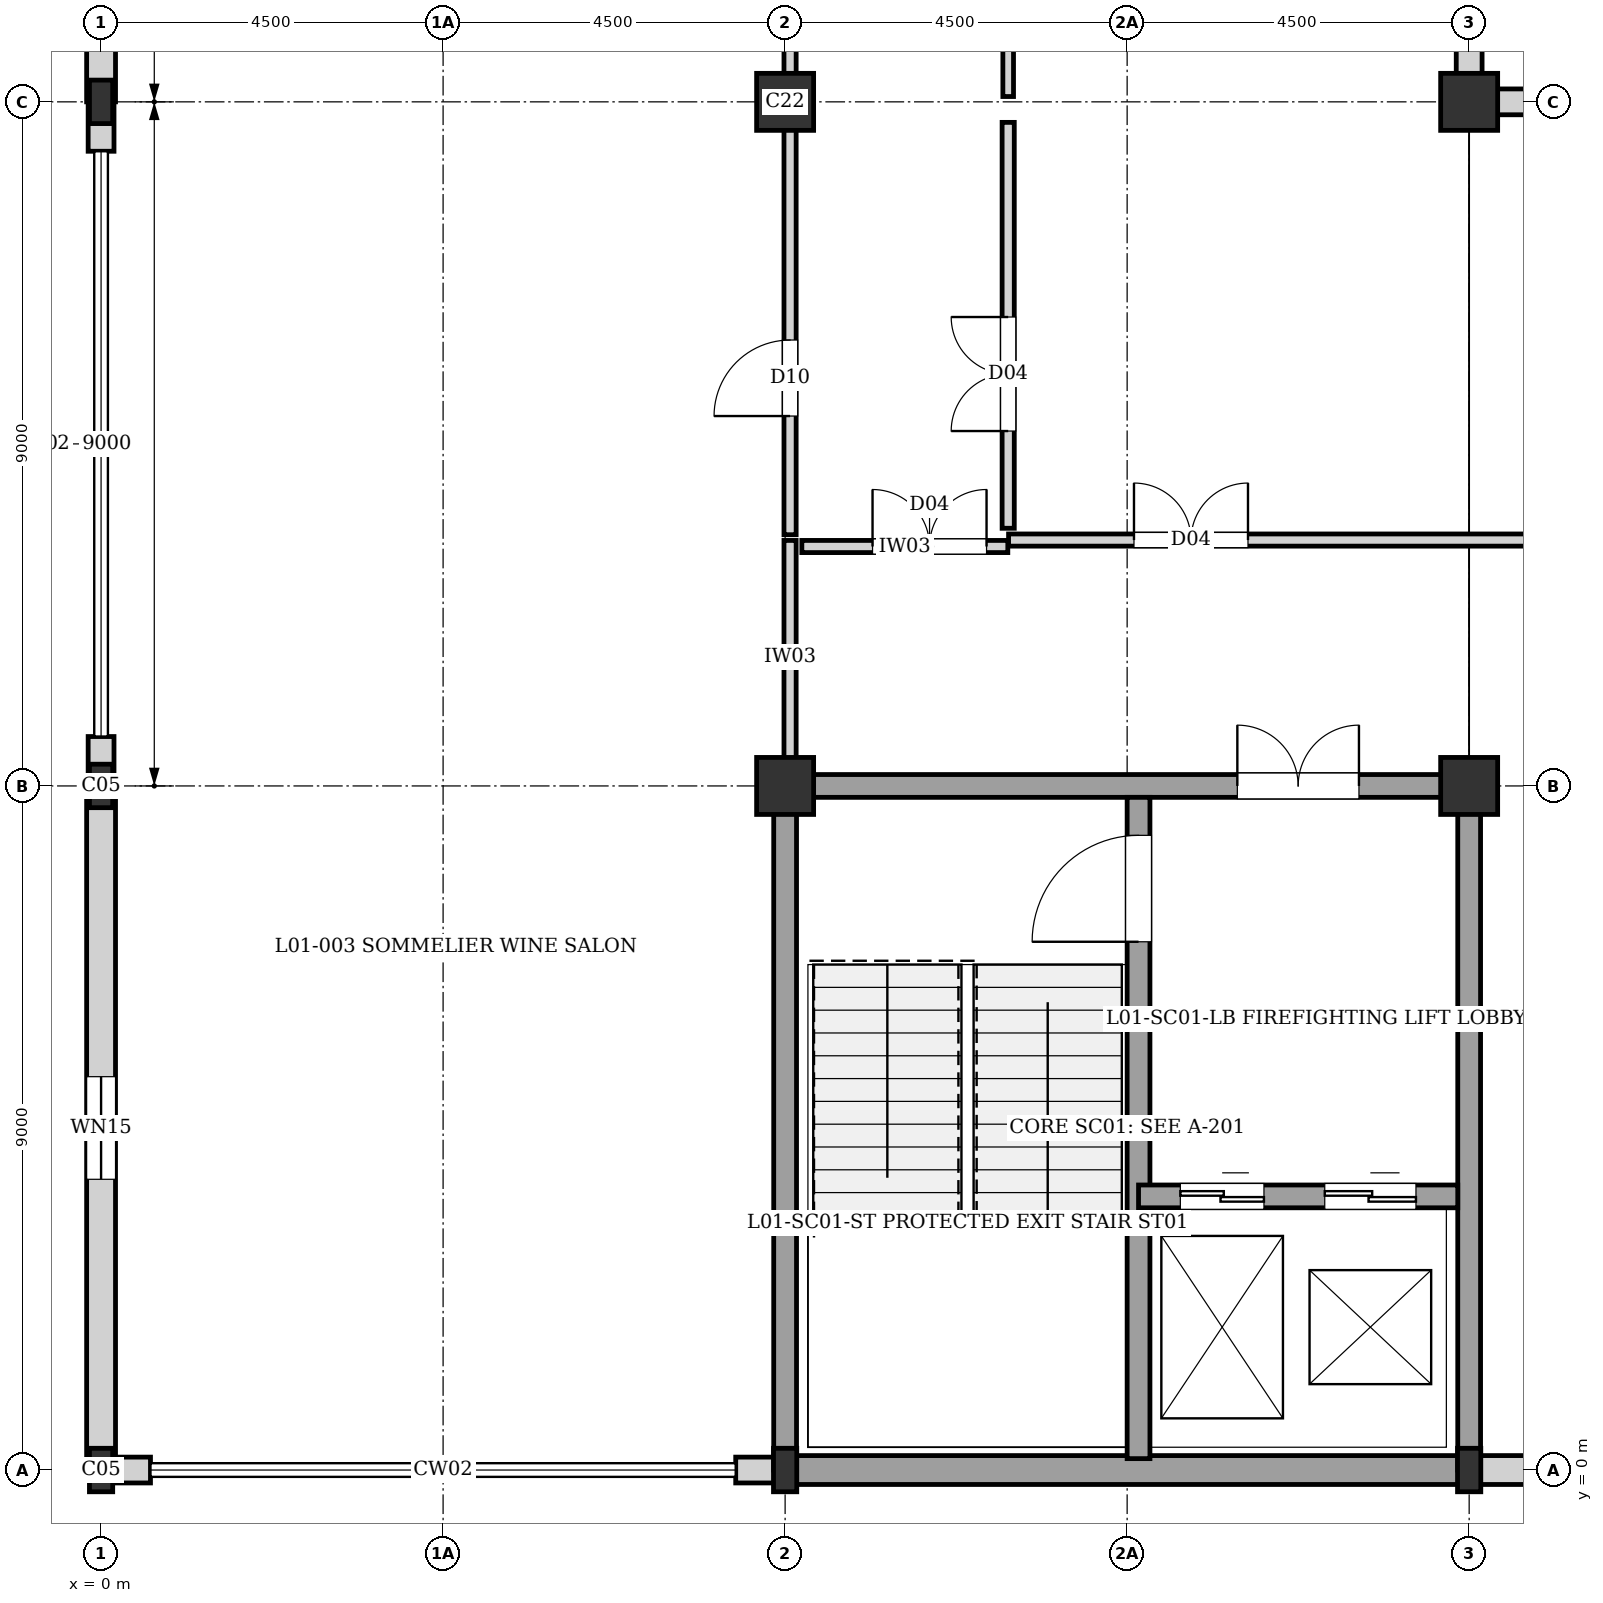
"""IFC4 building model, lengths in metres.
Left out: names, types, materials, properties, quantities, classifications, styles, units other than length and angle.
Written with IfcOpenShell. Run it as: python <this file> out.ifc"""

import sys

from ifc_helpers import new_model, si_unit, direction, frame, frame_2d, origin, origin_2d, place, context, subcontext, project, spatial, rectangle, i_section, extrude, element, fill, save


model = new_model("IFC4")
c1 = context("Model", 3, precision=1e-05, world=origin(), true_north=direction((0.0, 1.0)))
c2 = subcontext(c1, "Body", "Model", "MODEL_VIEW")
j1 = project(units=[si_unit("LENGTHUNIT", "METRE"), si_unit("PLANEANGLEUNIT", "RADIAN")], contexts=[c1])
p1 = place(None, origin())
s1 = spatial("IfcSite", under=j1, at=p1, CompositionType="ELEMENT")
p2 = place(p1, origin())
s2 = spatial("IfcBuilding", under=s1, at=p2, CompositionType="ELEMENT")
p3 = place(p2, frame((0.0, 0.0, 4.32)))
s3 = spatial("IfcBuildingStorey", under=s2, at=p3, CompositionType="ELEMENT", Elevation=4.32)
for number, where, z_axis, x_axis in (
    (1, (0.0, 0.0, 0.0), (0.0, 0.0, 1.0), (1.0, 0.0, 0.0)),
    (2, (0.0, 9.0, 0.0), (0.0, 0.0, 1.0), (1.0, 0.0, 0.0)),
    (3, (0.0, 18.0, 0.0), (0.0, 0.0, 1.0), (1.0, 0.0, 0.0)),
    (4, (9.0, 0.0, 0.0), (0.0, 0.0, 1.0), (1.0, 0.0, 0.0)),
):
    element("IfcColumn", number, at=place(p3, frame(where, z_axis=z_axis, x_axis=x_axis)), inside=s3, PredefinedType="COLUMN", context=c2, shape_type="SweptSolid", body=[
        extrude(i_section(OverallWidth=0.306, OverallDepth=0.572, WebThickness=0.021, FlangeThickness=0.04, at=origin_2d()), origin(), (0.0, 0.0, 1.0), 3.84),
    ])
for number, where, z_axis, x_axis in (
    (5, (9.0, 9.0, 0.0), (0.0, 0.0, 1.0), (1.0, 0.0, 0.0)),
    (6, (9.0, 18.0, 0.0), (0.0, 0.0, 1.0), (1.0, 0.0, 0.0)),
):
    element("IfcColumn", number, at=place(p3, frame(where, z_axis=z_axis, x_axis=x_axis)), inside=s3, PredefinedType="COLUMN", context=c2, shape_type="SweptSolid", body=[
        extrude(rectangle(XDim=0.75, YDim=0.75, at=origin_2d()), origin(), (0.0, 0.0, 1.0), 3.84),
    ])
p4 = place(p3, frame((18.0, 0.0, 0.0), z_axis=(0.0, 0.0, 1.0), x_axis=(1.0, 0.0, 0.0)))
e7 = element("IfcColumn", 7, at=p4, inside=s3, PredefinedType="COLUMN", context=c2, shape_type="SweptSolid", body=[
    extrude(i_section(OverallWidth=0.306, OverallDepth=0.572, WebThickness=0.021, FlangeThickness=0.04, at=origin_2d()), origin(), (0.0, 0.0, 1.0), 3.84),
])
for number, where, z_axis, x_axis in (
    (8, (18.0, 9.0, 0.0), (0.0, 0.0, 1.0), (1.0, 0.0, 0.0)),
    (9, (18.0, 18.0, 0.0), (0.0, 0.0, 1.0), (1.0, 0.0, 0.0)),
):
    element("IfcColumn", number, at=place(p3, frame(where, z_axis=z_axis, x_axis=x_axis)), inside=s3, PredefinedType="COLUMN", context=c2, shape_type="SweptSolid", body=[
        extrude(rectangle(XDim=0.75, YDim=0.75, at=origin_2d()), origin(), (0.0, 0.0, 1.0), 3.84),
    ])
p5 = place(p3, frame((27.0, 0.0, 0.0), z_axis=(0.0, 0.0, 1.0), x_axis=(-1.0, 0.0, 0.0)))
e10 = element("IfcWall", 10, at=p5, inside=s3, PredefinedType="SOLIDWALL", context=c2, shape_type="SweptSolid", body=[
    extrude(rectangle(XDim=8.87, YDim=0.38, at=frame_2d((4.435, 0.0))), origin(), (0.0, 0.0, 1.0), 2.38),
])
p6 = place(p3, frame((18.0, 0.0, 0.0), z_axis=(0.0, 0.0, 1.0), x_axis=(-1.0, 0.0, 0.0)))
e11 = element("IfcWall", 11, at=p6, inside=s3, PredefinedType="SOLIDWALL", context=c2, shape_type="SweptSolid", body=[
    extrude(rectangle(XDim=9.0, YDim=0.38, at=frame_2d((4.5, 0.0))), origin(), (0.0, 0.0, 1.0), 3.6),
])
p7 = place(p3, frame((8.87, 0.0, 0.0), z_axis=(0.0, 0.0, 1.0), x_axis=(-1.0, 0.0, 0.0)))
e12 = element("IfcWall", 12, at=p7, inside=s3, PredefinedType="SOLIDWALL", context=c2, shape_type="SweptSolid", body=[
    extrude(rectangle(XDim=0.52, YDim=0.34, at=frame_2d((0.26, 0.0))), origin(), (0.0, 0.0, 1.0), 3.18),
])
p8 = place(p3, frame((0.65, 0.0, 0.0), z_axis=(0.0, 0.0, 1.0), x_axis=(-1.0, 0.0, 0.0)))
e13 = element("IfcWall", 13, at=p8, inside=s3, PredefinedType="SOLIDWALL", context=c2, shape_type="SweptSolid", body=[
    extrude(rectangle(XDim=0.65, YDim=0.34, at=frame_2d((0.325, 0.0))), origin(), (0.0, 0.0, 1.0), 3.18),
])
p9 = place(p3, frame((0.0, 0.155, 0.0), z_axis=(0.0, 0.0, 1.0), x_axis=(0.0, 1.0, 0.0)))
e14 = element("IfcWall", 14, at=p9, inside=s3, PredefinedType="SOLIDWALL", context=c2, shape_type="SweptSolid", body=[
    extrude(rectangle(XDim=8.845, YDim=0.38, at=frame_2d((4.422, 0.0))), origin(), (0.0, 0.0, 1.0), 3.6),
])
p10 = place(p9, frame((3.67, 0.0, 0.4)))
e15 = element("IfcOpeningElement", 15, at=p10, cuts=e14, PredefinedType="OPENING", context=c2, shape_type="SweptSolid", body=[
    extrude(rectangle(XDim=1.35, YDim=1.8, at=frame_2d((0.675, 0.9))), frame((0.0, 0.2, 0.0), z_axis=(0.0, -1.0, 0.0), x_axis=(1.0, 0.0, 0.0)), (0.0, 0.0, 1.0), 0.4),
])
for number, where, z_axis, x_axis in (
    (16, (0.0, 9.0, 0.0), (0.0, 0.0, 1.0), (0.0, 1.0, 0.0)),
    (17, (0.0, 17.35, 0.0), (0.0, 0.0, 1.0), (0.0, 1.0, 0.0)),
):
    element("IfcWall", number, at=place(p3, frame(where, z_axis=z_axis, x_axis=x_axis)), inside=s3, PredefinedType="SOLIDWALL", context=c2, shape_type="SweptSolid", body=[
        extrude(rectangle(XDim=0.65, YDim=0.34, at=frame_2d((0.325, 0.0))), origin(), (0.0, 0.0, 1.0), 3.28),
    ])
p11 = place(p3, frame((0.0, 18.0, 0.0), z_axis=(0.0, 0.0, 1.0), x_axis=(0.0, 1.0, 0.0)))
e18 = element("IfcWall", 18, at=p11, inside=s3, PredefinedType="SOLIDWALL", context=c2, shape_type="SweptSolid", body=[
    extrude(rectangle(XDim=9.0, YDim=0.38, at=frame_2d((4.5, 0.0))), origin(), (0.0, 0.0, 1.0), 1.98),
])
p12 = place(p3, frame((18.0, 27.0, 0.0), z_axis=(0.0, 0.0, 1.0), x_axis=(0.0, -1.0, 0.0)))
e19 = element("IfcWall", 19, at=p12, inside=s3, PredefinedType="SOLIDWALL", context=c2, shape_type="SweptSolid", body=[
    extrude(rectangle(XDim=8.845, YDim=0.34, at=frame_2d((4.422, 0.0))), origin(), (0.0, 0.0, 1.0), 2.48),
])
p13 = place(p3, frame((18.0, 18.0, 0.0), z_axis=(0.0, 0.0, 1.0), x_axis=(1.0, 0.0, 0.0)))
e20 = element("IfcWall", 20, at=p13, inside=s3, PredefinedType="SOLIDWALL", context=c2, shape_type="SweptSolid", body=[
    extrude(rectangle(XDim=9.0, YDim=0.34, at=frame_2d((4.5, 0.0))), origin(), (0.0, 0.0, 1.0), 2.38),
])
p14 = place(p3, frame((18.0, 0.0, 0.0), z_axis=(0.0, 0.0, 1.0), x_axis=(0.0, 1.0, 0.0)))
e21 = element("IfcWall", 21, at=p14, inside=s3, PredefinedType="SHEAR", context=c2, shape_type="SweptSolid", body=[
    extrude(rectangle(XDim=9.0, YDim=0.3, at=frame_2d((4.5, 0.0))), origin(), (0.0, 0.0, 1.0), 3.6),
])
p15 = place(p3, frame((9.0, 9.0, 0.0), z_axis=(0.0, 0.0, 1.0), x_axis=(1.0, 0.0, 0.0)))
e22 = element("IfcWall", 22, at=p15, inside=s3, PredefinedType="SHEAR", context=c2, shape_type="SweptSolid", body=[
    extrude(rectangle(XDim=9.0, YDim=0.3, at=frame_2d((4.5, 0.0))), origin(), (0.0, 0.0, 1.0), 3.6),
])
p16 = place(p15, frame((5.95, 0.0, 0.0)))
e23 = element("IfcOpeningElement", 23, at=p16, cuts=e22, PredefinedType="OPENING", context=c2, shape_type="SweptSolid", body=[
    extrude(rectangle(XDim=1.6, YDim=2.1, at=frame_2d((0.8, 1.05))), frame((0.0, 0.16, 0.0), z_axis=(0.0, -1.0, 0.0), x_axis=(1.0, 0.0, 0.0)), (0.0, 0.0, 1.0), 0.32),
])
p17 = place(p3, frame((9.0, 0.0, 0.0), z_axis=(0.0, 0.0, 1.0), x_axis=(0.0, 1.0, 0.0)))
e24 = element("IfcWall", 24, at=p17, inside=s3, PredefinedType="SHEAR", context=c2, shape_type="SweptSolid", body=[
    extrude(rectangle(XDim=9.0, YDim=0.3, at=frame_2d((4.5, 0.0))), origin(), (0.0, 0.0, 1.0), 3.6),
])
p18 = place(p3, frame((13.65, 0.15, 0.0), z_axis=(0.0, 0.0, 1.0), x_axis=(0.0, 1.0, 0.0)))
e25 = element("IfcWall", 25, at=p18, inside=s3, PredefinedType="SHEAR", context=c2, shape_type="SweptSolid", body=[
    extrude(rectangle(XDim=8.7, YDim=0.3, at=frame_2d((4.35, 0.0))), origin(), (0.0, 0.0, 1.0), 3.6),
])
p19 = place(p18, frame((6.8, 0.0, 0.0)))
e26 = element("IfcOpeningElement", 26, at=p19, cuts=e25, PredefinedType="OPENING", context=c2, shape_type="SweptSolid", body=[
    extrude(rectangle(XDim=1.4, YDim=2.02, at=frame_2d((0.7, 1.01))), frame((0.0, 0.16, 0.0), z_axis=(0.0, -1.0, 0.0), x_axis=(1.0, 0.0, 0.0)), (0.0, 0.0, 1.0), 0.32),
])
p20 = place(p3, frame((13.65, 3.6, 0.0), z_axis=(0.0, 0.0, 1.0), x_axis=(1.0, 0.0, 0.0)))
e27 = element("IfcWall", 27, at=p20, inside=s3, PredefinedType="SHEAR", context=c2, shape_type="SweptSolid", body=[
    extrude(rectangle(XDim=4.2, YDim=0.3, at=frame_2d((2.1, 0.0))), origin(), (0.0, 0.0, 1.0), 3.6),
])
p21 = place(p20, frame((0.55, 0.0, 0.0)))
e28 = element("IfcOpeningElement", 28, at=p21, cuts=e27, PredefinedType="OPENING", context=c2, shape_type="SweptSolid", body=[
    extrude(rectangle(XDim=1.1, YDim=2.1, at=frame_2d((0.55, 1.05))), frame((0.0, 0.16, 0.0), z_axis=(0.0, -1.0, 0.0), x_axis=(1.0, 0.0, 0.0)), (0.0, 0.0, 1.0), 0.32),
])
p22 = place(p20, frame((2.45, 0.0, 0.0)))
e29 = element("IfcOpeningElement", 29, at=p22, cuts=e27, PredefinedType="OPENING", context=c2, shape_type="SweptSolid", body=[
    extrude(rectangle(XDim=1.2, YDim=2.2, at=frame_2d((0.6, 1.1))), frame((0.0, 0.16, 0.0), z_axis=(0.0, -1.0, 0.0), x_axis=(1.0, 0.0, 0.0)), (0.0, 0.0, 1.0), 0.32),
])
p23 = place(p3, frame((9.065, 9.155, 0.0), z_axis=(0.0, 0.0, 1.0), x_axis=(0.0, 1.0, 0.0)))
e30 = element("IfcWall", 30, at=p23, inside=s3, PredefinedType="PARTITIONING", context=c2, shape_type="SweptSolid", body=[
    extrude(rectangle(XDim=3.075, YDim=0.16, at=frame_2d((1.538, 0.0))), origin(), (0.0, 0.0, 1.0), 2.99),
])
p24 = place(p3, frame((9.22, 12.15, 0.0), z_axis=(0.0, 0.0, 1.0), x_axis=(1.0, 0.0, 0.0)))
e31 = element("IfcWall", 31, at=p24, inside=s3, PredefinedType="PARTITIONING", context=c2, shape_type="SweptSolid", body=[
    extrude(rectangle(XDim=2.71, YDim=0.16, at=frame_2d((1.355, 0.0))), origin(), (0.0, 0.0, 1.0), 3.6),
])
p25 = place(p24, frame((0.93, 0.0, 0.0)))
e32 = element("IfcOpeningElement", 32, at=p25, cuts=e31, PredefinedType="OPENING", context=c2, shape_type="SweptSolid", body=[
    extrude(rectangle(XDim=1.5, YDim=2.1, at=frame_2d((0.75, 1.05))), frame((0.0, 0.09, 0.0), z_axis=(0.0, -1.0, 0.0), x_axis=(1.0, 0.0, 0.0)), (0.0, 0.0, 1.0), 0.18),
])
p26 = place(p3, frame((11.94, 12.235, 0.0), z_axis=(0.0, 0.0, 1.0), x_axis=(1.0, 0.0, 0.0)))
e33 = element("IfcWall", 33, at=p26, inside=s3, PredefinedType="PARTITIONING", context=c2, shape_type="SweptSolid", body=[
    extrude(rectangle(XDim=23.84, YDim=0.16, at=frame_2d((11.92, 0.0))), origin(), (0.0, 0.0, 1.0), 3.6),
])
p27 = place(p26, frame((1.65, 0.0, 0.0)))
e34 = element("IfcOpeningElement", 34, at=p27, cuts=e33, PredefinedType="OPENING", context=c2, shape_type="SweptSolid", body=[
    extrude(rectangle(XDim=1.5, YDim=2.1, at=frame_2d((0.75, 1.05))), frame((0.0, 0.09, 0.0), z_axis=(0.0, -1.0, 0.0), x_axis=(1.0, 0.0, 0.0)), (0.0, 0.0, 1.0), 0.18),
])
p28 = place(p3, frame((9.065, 12.305, 0.0), z_axis=(0.0, 0.0, 1.0), x_axis=(0.0, 1.0, 0.0)))
e35 = element("IfcWall", 35, at=p28, inside=s3, PredefinedType="PARTITIONING", context=c2, shape_type="SweptSolid", body=[
    extrude(rectangle(XDim=5.425, YDim=0.16, at=frame_2d((2.712, 0.0))), origin(), (0.0, 0.0, 1.0), 2.99),
])
p29 = place(p28, frame((1.562, 0.0, 0.0)))
e36 = element("IfcOpeningElement", 36, at=p29, cuts=e35, PredefinedType="OPENING", context=c2, shape_type="SweptSolid", body=[
    extrude(rectangle(XDim=1.0, YDim=2.1, at=frame_2d((0.5, 1.05))), frame((0.0, 0.09, 0.0), z_axis=(0.0, -1.0, 0.0), x_axis=(1.0, 0.0, 0.0)), (0.0, 0.0, 1.0), 0.18),
])
p30 = place(p3, frame((11.935, 12.39, 0.0), z_axis=(0.0, 0.0, 1.0), x_axis=(0.0, 1.0, 0.0)))
e37 = element("IfcWall", 37, at=p30, inside=s3, PredefinedType="PARTITIONING", context=c2, shape_type="SweptSolid", body=[
    extrude(rectangle(XDim=5.34, YDim=0.16, at=frame_2d((2.67, 0.0))), origin(), (0.0, 0.0, 1.0), 3.6),
])
p31 = place(p30, frame((1.279, 0.0, 0.0)))
e38 = element("IfcOpeningElement", 38, at=p31, cuts=e37, PredefinedType="OPENING", context=c2, shape_type="SweptSolid", body=[
    extrude(rectangle(XDim=1.5, YDim=2.1, at=frame_2d((0.75, 1.05))), frame((0.0, 0.09, 0.0), z_axis=(0.0, -1.0, 0.0), x_axis=(1.0, 0.0, 0.0)), (0.0, 0.0, 1.0), 0.18),
])
p32 = place(p3, frame((9.065, 18.07, 0.0), z_axis=(0.0, 0.0, 1.0), x_axis=(0.0, 1.0, 0.0)))
e39 = element("IfcWall", 39, at=p32, inside=s3, PredefinedType="PARTITIONING", context=c2, shape_type="SweptSolid", body=[
    extrude(rectangle(XDim=8.95, YDim=0.16, at=frame_2d((4.475, 0.0))), origin(), (0.0, 0.0, 1.0), 2.89),
])
p33 = place(p3, frame((11.935, 18.07, 0.0), z_axis=(0.0, 0.0, 1.0), x_axis=(0.0, 1.0, 0.0)))
e40 = element("IfcWall", 40, at=p33, inside=s3, PredefinedType="PLUMBINGWALL", context=c2, shape_type="SweptSolid", body=[
    extrude(rectangle(XDim=4.21, YDim=0.14, at=frame_2d((2.105, 0.0))), origin(), (0.0, 0.0, 1.0), 3.6),
])
p34 = place(p33, frame((2.16, 0.0, 0.0)))
e41 = element("IfcOpeningElement", 41, at=p34, cuts=e40, PredefinedType="OPENING", context=c2, shape_type="SweptSolid", body=[
    extrude(rectangle(XDim=0.9, YDim=2.1, at=frame_2d((0.45, 1.05))), frame((0.0, 0.08, 0.0), z_axis=(0.0, -1.0, 0.0), x_axis=(1.0, 0.0, 0.0)), (0.0, 0.0, 1.0), 0.16),
])
p35 = place(p10, origin())
e42 = element("IfcWindow", 42, at=p35, inside=s3, PartitioningType="SINGLE_PANEL", PredefinedType="WINDOW", context=c2, shape_type="SweptSolid", body=[
    extrude(rectangle(XDim=1.35, YDim=1.8, at=frame_2d((0.675, 0.9))), frame((0.0, 0.03, 0.0), z_axis=(0.0, -1.0, 0.0), x_axis=(1.0, 0.0, 0.0)), (0.0, 0.0, 1.0), 0.06),
])
fill(e15, e42)
p36 = place(p16, origin())
e43 = element("IfcDoor", 43, at=p36, inside=s3, OperationType="DOUBLE_DOOR_SINGLE_SWING", PredefinedType="DOOR", context=c2, shape_type="SweptSolid", body=[
    extrude(rectangle(XDim=1.6, YDim=2.1, at=frame_2d((0.8, 1.05))), frame((0.0, 0.025, 0.0), z_axis=(0.0, -1.0, 0.0), x_axis=(1.0, 0.0, 0.0)), (0.0, 0.0, 1.0), 0.05),
])
fill(e23, e43)
p37 = place(p19, origin())
e44 = element("IfcDoor", 44, at=p37, inside=s3, OperationType="SINGLE_SWING_LEFT", PredefinedType="DOOR", context=c2, shape_type="SweptSolid", body=[
    extrude(rectangle(XDim=1.4, YDim=2.02, at=frame_2d((0.7, 1.01))), frame((0.0, 0.025, 0.0), z_axis=(0.0, -1.0, 0.0), x_axis=(1.0, 0.0, 0.0)), (0.0, 0.0, 1.0), 0.05),
])
fill(e26, e44)
p38 = place(p21, origin())
e45 = element("IfcDoor", 45, at=p38, inside=s3, OperationType="DOUBLE_DOOR_SLIDING", PredefinedType="DOOR", context=c2, shape_type="SweptSolid", body=[
    extrude(rectangle(XDim=1.1, YDim=2.1, at=frame_2d((0.55, 1.05))), frame((0.0, 0.025, 0.0), z_axis=(0.0, -1.0, 0.0), x_axis=(1.0, 0.0, 0.0)), (0.0, 0.0, 1.0), 0.05),
])
fill(e28, e45)
p39 = place(p22, origin())
e46 = element("IfcDoor", 46, at=p39, inside=s3, OperationType="DOUBLE_DOOR_SLIDING", PredefinedType="DOOR", context=c2, shape_type="SweptSolid", body=[
    extrude(rectangle(XDim=1.2, YDim=2.2, at=frame_2d((0.6, 1.1))), frame((0.0, 0.025, 0.0), z_axis=(0.0, -1.0, 0.0), x_axis=(1.0, 0.0, 0.0)), (0.0, 0.0, 1.0), 0.05),
])
fill(e29, e46)
p40 = place(p25, origin())
e47 = element("IfcDoor", 47, at=p40, inside=s3, OperationType="DOUBLE_DOOR_SINGLE_SWING", PredefinedType="DOOR", context=c2, shape_type="SweptSolid", body=[
    extrude(rectangle(XDim=1.5, YDim=2.1, at=frame_2d((0.75, 1.05))), frame((0.0, 0.025, 0.0), z_axis=(0.0, -1.0, 0.0), x_axis=(1.0, 0.0, 0.0)), (0.0, 0.0, 1.0), 0.05),
])
fill(e32, e47)
p41 = place(p27, origin())
e48 = element("IfcDoor", 48, at=p41, inside=s3, OperationType="DOUBLE_DOOR_SINGLE_SWING", PredefinedType="DOOR", context=c2, shape_type="SweptSolid", body=[
    extrude(rectangle(XDim=1.5, YDim=2.1, at=frame_2d((0.75, 1.05))), frame((0.0, 0.025, 0.0), z_axis=(0.0, -1.0, 0.0), x_axis=(1.0, 0.0, 0.0)), (0.0, 0.0, 1.0), 0.05),
])
fill(e34, e48)
p42 = place(p29, origin())
e49 = element("IfcDoor", 49, at=p42, inside=s3, OperationType="SINGLE_SWING_LEFT", PredefinedType="DOOR", context=c2, shape_type="SweptSolid", body=[
    extrude(rectangle(XDim=1.0, YDim=2.1, at=frame_2d((0.5, 1.05))), frame((0.0, 0.025, 0.0), z_axis=(0.0, -1.0, 0.0), x_axis=(1.0, 0.0, 0.0)), (0.0, 0.0, 1.0), 0.05),
])
fill(e36, e49)
p43 = place(p31, origin())
e50 = element("IfcDoor", 50, at=p43, inside=s3, OperationType="DOUBLE_DOOR_SINGLE_SWING", PredefinedType="DOOR", context=c2, shape_type="SweptSolid", body=[
    extrude(rectangle(XDim=1.5, YDim=2.1, at=frame_2d((0.75, 1.05))), frame((0.0, 0.025, 0.0), z_axis=(0.0, -1.0, 0.0), x_axis=(1.0, 0.0, 0.0)), (0.0, 0.0, 1.0), 0.05),
])
fill(e38, e50)
save(model, sys.argv[1])
